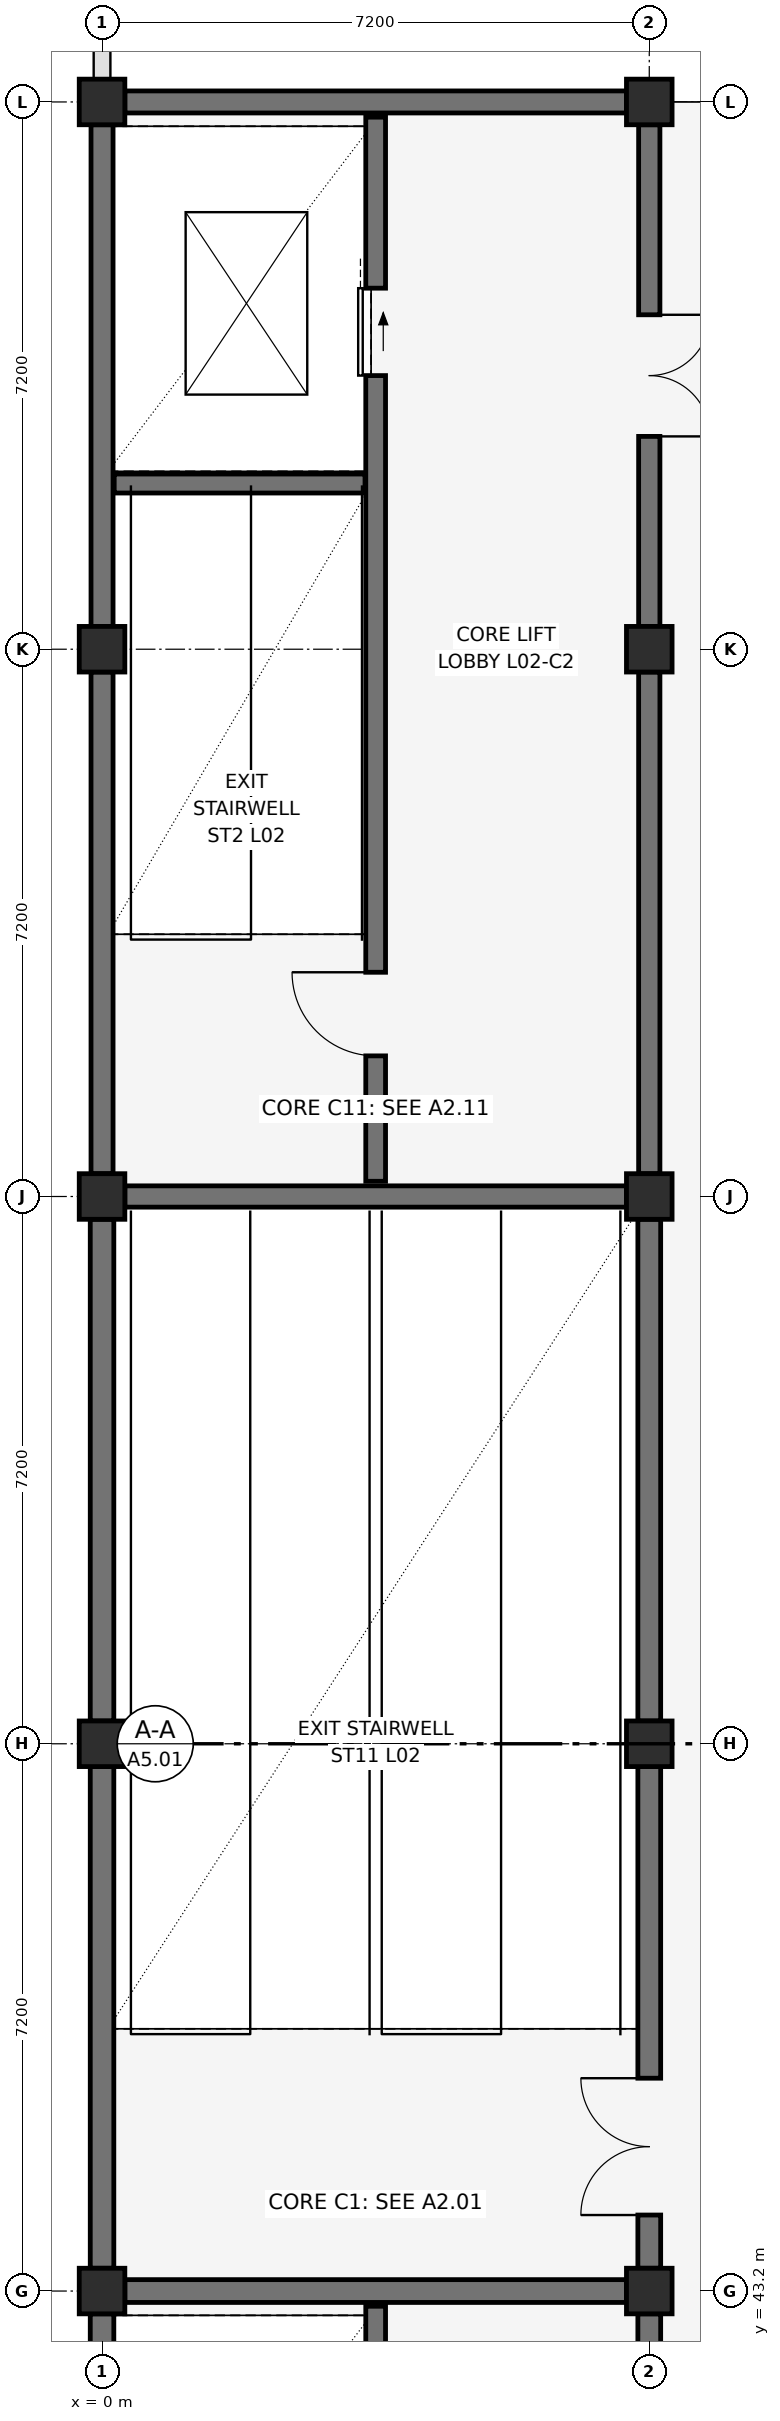
"""IFC4 building model, lengths in metres.
Left out: names, types, materials, properties, quantities, classifications, styles, units other than length and angle.
Written with IfcOpenShell. Run it as: python <this file> out.ifc"""

import sys

from ifc_helpers import new_model, si_unit, direction, frame, frame_2d, origin, origin_2d, place, context, subcontext, project, spatial, rectangle, extrude, element, fill, save


model = new_model("IFC4")
c1 = context("Model", 3, precision=1e-05, world=origin(), true_north=direction((0.0, 1.0)))
c2 = subcontext(c1, "Body", "Model", "MODEL_VIEW")
j1 = project(units=[si_unit("LENGTHUNIT", "METRE"), si_unit("PLANEANGLEUNIT", "RADIAN")], contexts=[c1])
p1 = place(None, origin())
s1 = spatial("IfcSite", under=j1, at=p1, CompositionType="ELEMENT")
p2 = place(p1, origin())
s2 = spatial("IfcBuilding", under=s1, at=p2, CompositionType="ELEMENT")
p3 = place(p2, frame((0.0, 0.0, 10.2)))
s3 = spatial("IfcBuildingStorey", under=s2, at=p3, CompositionType="ELEMENT", Elevation=10.2)
for number, where, z_axis, x_axis in (
    (1, (0.0, 43.2, 0.0), (0.0, 0.0, 1.0), (1.0, 0.0, 0.0)),
    (2, (0.0, 50.4, 0.0), (0.0, 0.0, 1.0), (1.0, 0.0, 0.0)),
    (3, (0.0, 57.6, 0.0), (0.0, 0.0, 1.0), (1.0, 0.0, 0.0)),
    (4, (0.0, 64.8, 0.0), (0.0, 0.0, 1.0), (1.0, 0.0, 0.0)),
    (5, (0.0, 72.0, 0.0), (0.0, 0.0, 1.0), (1.0, 0.0, 0.0)),
    (6, (7.2, 43.2, 0.0), (0.0, 0.0, 1.0), (1.0, 0.0, 0.0)),
    (7, (7.2, 50.4, 0.0), (0.0, 0.0, 1.0), (1.0, 0.0, 0.0)),
    (8, (7.2, 57.6, 0.0), (0.0, 0.0, 1.0), (1.0, 0.0, 0.0)),
    (9, (7.2, 64.8, 0.0), (0.0, 0.0, 1.0), (1.0, 0.0, 0.0)),
    (10, (7.2, 72.0, 0.0), (0.0, 0.0, 1.0), (1.0, 0.0, 0.0)),
):
    element("IfcColumn", number, at=place(p3, frame(where, z_axis=z_axis, x_axis=x_axis)), inside=s3, PredefinedType="COLUMN", context=c2, shape_type="SweptSolid", body=[
        extrude(rectangle(XDim=0.6, YDim=0.6, at=origin_2d()), origin(), (0.0, 0.0, 1.0), 4.8),
    ])
p4 = place(p3, frame((0.3, 43.2, 0.0), z_axis=(0.0, 0.0, 1.0), x_axis=(1.0, 0.0, 0.0)))
e11 = element("IfcWall", 11, at=p4, inside=s3, PredefinedType="SHEAR", context=c2, shape_type="SweptSolid", body=[
    extrude(rectangle(XDim=6.6, YDim=0.3, at=frame_2d((3.3, 0.0))), origin(), (0.0, 0.0, 1.0), 4.56),
])
p5 = place(p3, frame((0.0, 36.3, 0.0), z_axis=(0.0, 0.0, 1.0), x_axis=(0.0, 1.0, 0.0)))
e12 = element("IfcWall", 12, at=p5, inside=s3, PredefinedType="SHEAR", context=c2, shape_type="SweptSolid", body=[
    extrude(rectangle(XDim=6.6, YDim=0.31, at=frame_2d((3.3, 0.0))), origin(), (0.0, 0.0, 1.0), 4.56),
])
p6 = place(p3, frame((7.2, 36.3, 0.0), z_axis=(0.0, 0.0, 1.0), x_axis=(0.0, 1.0, 0.0)))
e13 = element("IfcWall", 13, at=p6, inside=s3, PredefinedType="SHEAR", context=c2, shape_type="SweptSolid", body=[
    extrude(rectangle(XDim=6.6, YDim=0.3, at=frame_2d((3.3, 0.0))), origin(), (0.0, 0.0, 1.0), 4.56),
])
p7 = place(p6, frame((2.5, 0.0, 0.0)))
e14 = element("IfcOpeningElement", 14, at=p7, cuts=e13, PredefinedType="OPENING", context=c2, shape_type="SweptSolid", body=[
    extrude(rectangle(XDim=1.6, YDim=2.2, at=frame_2d((0.8, 1.1))), frame((0.0, 0.165, 0.0), z_axis=(0.0, -1.0, 0.0), x_axis=(1.0, 0.0, 0.0)), (0.0, 0.0, 1.0), 0.33),
])
p8 = place(p3, frame((3.6, 29.0, 0.0), z_axis=(0.0, 0.0, 1.0), x_axis=(0.0, 1.0, 0.0)))
e15 = element("IfcWall", 15, at=p8, inside=s3, PredefinedType="SHEAR", context=c2, shape_type="SweptSolid", body=[
    extrude(rectangle(XDim=14.0, YDim=0.26, at=frame_2d((7.0, 0.0))), origin(), (0.0, 0.0, 1.0), 4.56),
])
p9 = place(p8, frame((1.65, 0.0, 0.0)))
e16 = element("IfcOpeningElement", 16, at=p9, cuts=e15, PredefinedType="OPENING", context=c2, shape_type="SweptSolid", body=[
    extrude(rectangle(XDim=1.1, YDim=2.15, at=frame_2d((0.55, 1.075))), frame((0.0, 0.145, 0.0), z_axis=(0.0, -1.0, 0.0), x_axis=(1.0, 0.0, 0.0)), (0.0, 0.0, 1.0), 0.29),
])
p10 = place(p8, frame((10.6, 0.0, 0.0)))
e17 = element("IfcOpeningElement", 17, at=p10, cuts=e15, PredefinedType="OPENING", context=c2, shape_type="SweptSolid", body=[
    extrude(rectangle(XDim=1.1, YDim=2.2, at=frame_2d((0.55, 1.1))), frame((0.0, 0.145, 0.0), z_axis=(0.0, -1.0, 0.0), x_axis=(1.0, 0.0, 0.0)), (0.0, 0.0, 1.0), 0.29),
])
p11 = place(p3, frame((0.3, 57.6, 0.0), z_axis=(0.0, 0.0, 1.0), x_axis=(1.0, 0.0, 0.0)))
e18 = element("IfcWall", 18, at=p11, inside=s3, PredefinedType="SHEAR", context=c2, shape_type="SweptSolid", body=[
    extrude(rectangle(XDim=6.6, YDim=0.28, at=frame_2d((3.3, 0.0))), origin(), (0.0, 0.0, 1.0), 4.56),
])
p12 = place(p3, frame((0.3, 72.0, 0.0), z_axis=(0.0, 0.0, 1.0), x_axis=(1.0, 0.0, 0.0)))
e19 = element("IfcWall", 19, at=p12, inside=s3, PredefinedType="SHEAR", context=c2, shape_type="SweptSolid", body=[
    extrude(rectangle(XDim=6.6, YDim=0.29, at=frame_2d((3.3, 0.0))), origin(), (0.0, 0.0, 1.0), 4.56),
])
p13 = place(p3, frame((0.0, 57.9, 0.0), z_axis=(0.0, 0.0, 1.0), x_axis=(0.0, 1.0, 0.0)))
e20 = element("IfcWall", 20, at=p13, inside=s3, PredefinedType="SHEAR", context=c2, shape_type="SweptSolid", body=[
    extrude(rectangle(XDim=6.6, YDim=0.29, at=frame_2d((3.3, 0.0))), origin(), (0.0, 0.0, 1.0), 4.56),
])
p14 = place(p3, frame((0.0, 65.1, 0.0), z_axis=(0.0, 0.0, 1.0), x_axis=(0.0, 1.0, 0.0)))
e21 = element("IfcWall", 21, at=p14, inside=s3, PredefinedType="SHEAR", context=c2, shape_type="SweptSolid", body=[
    extrude(rectangle(XDim=6.6, YDim=0.29, at=frame_2d((3.3, 0.0))), origin(), (0.0, 0.0, 1.0), 4.56),
])
p15 = place(p3, frame((7.2, 57.9, 0.0), z_axis=(0.0, 0.0, 1.0), x_axis=(0.0, 1.0, 0.0)))
e22 = element("IfcWall", 22, at=p15, inside=s3, PredefinedType="SHEAR", context=c2, shape_type="SweptSolid", body=[
    extrude(rectangle(XDim=6.6, YDim=0.28, at=frame_2d((3.3, 0.0))), origin(), (0.0, 0.0, 1.0), 4.56),
])
p16 = place(p3, frame((7.2, 65.1, 0.0), z_axis=(0.0, 0.0, 1.0), x_axis=(0.0, 1.0, 0.0)))
e23 = element("IfcWall", 23, at=p16, inside=s3, PredefinedType="SHEAR", context=c2, shape_type="SweptSolid", body=[
    extrude(rectangle(XDim=6.6, YDim=0.28, at=frame_2d((3.3, 0.0))), origin(), (0.0, 0.0, 1.0), 4.56),
])
p17 = place(p16, frame((2.5, 0.0, 0.0)))
e24 = element("IfcOpeningElement", 24, at=p17, cuts=e23, PredefinedType="OPENING", context=c2, shape_type="SweptSolid", body=[
    extrude(rectangle(XDim=1.6, YDim=2.2, at=frame_2d((0.8, 1.1))), frame((0.0, 0.155, 0.0), z_axis=(0.0, -1.0, 0.0), x_axis=(1.0, 0.0, 0.0)), (0.0, 0.0, 1.0), 0.31),
])
p18 = place(p3, frame((3.6, 57.8, 0.0), z_axis=(0.0, 0.0, 1.0), x_axis=(0.0, 1.0, 0.0)))
e25 = element("IfcWall", 25, at=p18, inside=s3, PredefinedType="SHEAR", context=c2, shape_type="SweptSolid", body=[
    extrude(rectangle(XDim=14.0, YDim=0.26, at=frame_2d((7.0, 0.0))), origin(), (0.0, 0.0, 1.0), 4.56),
])
p19 = place(p18, frame((1.65, 0.0, 0.0)))
e26 = element("IfcOpeningElement", 26, at=p19, cuts=e25, PredefinedType="OPENING", context=c2, shape_type="SweptSolid", body=[
    extrude(rectangle(XDim=1.1, YDim=2.15, at=frame_2d((0.55, 1.075))), frame((0.0, 0.145, 0.0), z_axis=(0.0, -1.0, 0.0), x_axis=(1.0, 0.0, 0.0)), (0.0, 0.0, 1.0), 0.29),
])
p20 = place(p18, frame((10.6, 0.0, 0.0)))
e27 = element("IfcOpeningElement", 27, at=p20, cuts=e25, PredefinedType="OPENING", context=c2, shape_type="SweptSolid", body=[
    extrude(rectangle(XDim=1.15, YDim=2.2, at=frame_2d((0.575, 1.1))), frame((0.0, 0.145, 0.0), z_axis=(0.0, -1.0, 0.0), x_axis=(1.0, 0.0, 0.0)), (0.0, 0.0, 1.0), 0.29),
])
p21 = place(p3, frame((0.16, 66.98, 0.0), z_axis=(0.0, 0.0, 1.0), x_axis=(1.0, 0.0, 0.0)))
e28 = element("IfcWall", 28, at=p21, inside=s3, PredefinedType="SHEAR", context=c2, shape_type="SweptSolid", body=[
    extrude(rectangle(XDim=3.3, YDim=0.25, at=frame_2d((1.65, 0.0))), origin(), (0.0, 0.0, 1.0), 4.56),
])
for number, where, z_axis, x_axis in (
    (29, (0.0, 43.5, 0.0), (0.0, 0.0, 1.0), (0.0, 1.0, 0.0)),
    (30, (0.0, 50.7, 0.0), (0.0, 0.0, 1.0), (0.0, 1.0, 0.0)),
):
    element("IfcWall", number, at=place(p3, frame(where, z_axis=z_axis, x_axis=x_axis)), inside=s3, PredefinedType="SHEAR", context=c2, shape_type="SweptSolid", body=[
        extrude(rectangle(XDim=6.6, YDim=0.31, at=frame_2d((3.3, 0.0))), origin(), (0.0, 0.0, 1.0), 4.56),
    ])
p22 = place(p3, frame((7.2, 43.5, 0.0), z_axis=(0.0, 0.0, 1.0), x_axis=(0.0, 1.0, 0.0)))
e31 = element("IfcWall", 31, at=p22, inside=s3, PredefinedType="SHEAR", context=c2, shape_type="SweptSolid", body=[
    extrude(rectangle(XDim=6.6, YDim=0.3, at=frame_2d((3.3, 0.0))), origin(), (0.0, 0.0, 1.0), 4.56),
])
p23 = place(p22, frame((0.7, 0.0, 0.0)))
e32 = element("IfcOpeningElement", 32, at=p23, cuts=e31, PredefinedType="OPENING", context=c2, shape_type="SweptSolid", body=[
    extrude(rectangle(XDim=1.8, YDim=2.2, at=frame_2d((0.9, 1.1))), frame((0.0, 0.165, 0.0), z_axis=(0.0, -1.0, 0.0), x_axis=(1.0, 0.0, 0.0)), (0.0, 0.0, 1.0), 0.33),
])
p24 = place(p3, frame((7.2, 50.7, 0.0), z_axis=(0.0, 0.0, 1.0), x_axis=(0.0, 1.0, 0.0)))
e33 = element("IfcWall", 33, at=p24, inside=s3, PredefinedType="SHEAR", context=c2, shape_type="SweptSolid", body=[
    extrude(rectangle(XDim=6.6, YDim=0.3, at=frame_2d((3.3, 0.0))), origin(), (0.0, 0.0, 1.0), 4.56),
])
p25 = place(p19, origin())
e34 = element("IfcDoor", 34, at=p25, inside=s3, OperationType="SINGLE_SWING_RIGHT", PredefinedType="DOOR", context=c2, shape_type="SweptSolid", body=[
    extrude(rectangle(XDim=1.1, YDim=2.15, at=frame_2d((0.55, 1.075))), frame((0.0, 0.025, 0.0), z_axis=(0.0, -1.0, 0.0), x_axis=(1.0, 0.0, 0.0)), (0.0, 0.0, 1.0), 0.05),
])
fill(e26, e34)
p26 = place(p20, frame((1.15, 0.0, 0.0), z_axis=(0.0, 0.0, 1.0), x_axis=(-1.0, 0.0, 0.0)))
e35 = element("IfcDoor", 35, at=p26, inside=s3, OperationType="SLIDING_TO_RIGHT", PredefinedType="DOOR", context=c2, shape_type="SweptSolid", body=[
    extrude(rectangle(XDim=1.15, YDim=2.2, at=frame_2d((0.575, 1.1))), frame((0.0, 0.025, 0.0), z_axis=(0.0, -1.0, 0.0), x_axis=(1.0, 0.0, 0.0)), (0.0, 0.0, 1.0), 0.05),
])
fill(e27, e35)
p27 = place(p17, frame((1.6, 0.0, 0.0), z_axis=(0.0, 0.0, 1.0), x_axis=(-1.0, 0.0, 0.0)))
e36 = element("IfcDoor", 36, at=p27, inside=s3, OperationType="DOUBLE_SWING_LEFT", PredefinedType="DOOR", context=c2, shape_type="SweptSolid", body=[
    extrude(rectangle(XDim=1.6, YDim=2.2, at=frame_2d((0.8, 1.1))), frame((0.0, 0.025, 0.0), z_axis=(0.0, -1.0, 0.0), x_axis=(1.0, 0.0, 0.0)), (0.0, 0.0, 1.0), 0.05),
])
fill(e24, e36)
p28 = place(p23, origin())
e37 = element("IfcDoor", 37, at=p28, inside=s3, OperationType="DOUBLE_SWING_LEFT", PredefinedType="DOOR", context=c2, shape_type="SweptSolid", body=[
    extrude(rectangle(XDim=1.8, YDim=2.2, at=frame_2d((0.9, 1.1))), frame((0.0, 0.025, 0.0), z_axis=(0.0, -1.0, 0.0), x_axis=(1.0, 0.0, 0.0)), (0.0, 0.0, 1.0), 0.05),
])
fill(e32, e37)
save(model, sys.argv[1])
